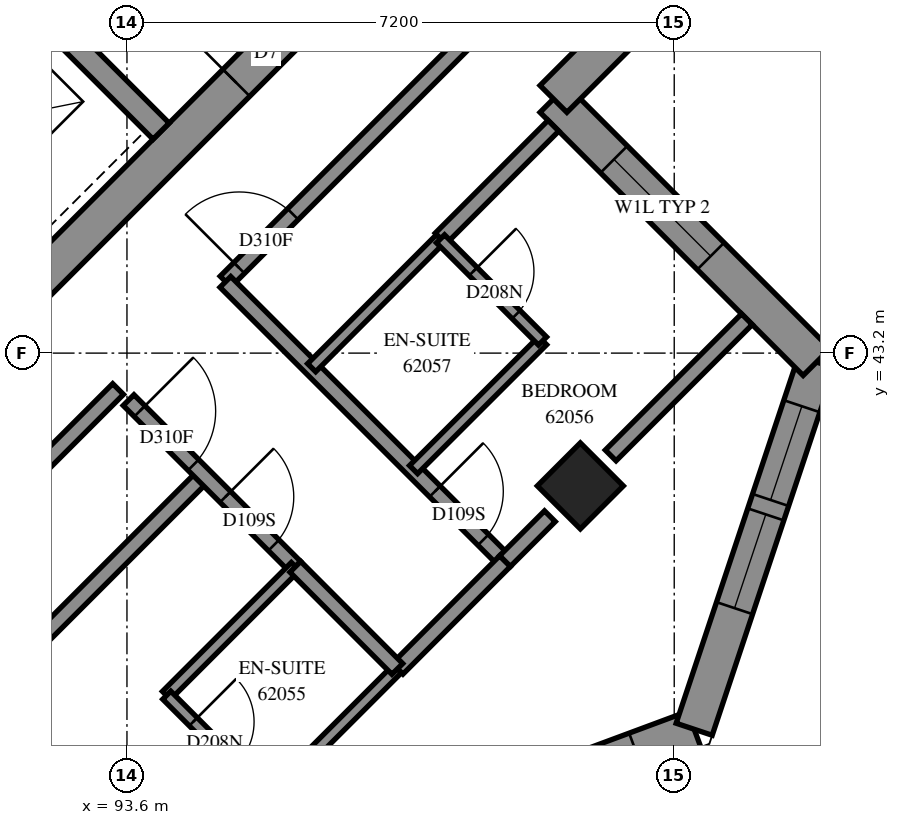
"""IFC4 building model, lengths in metres.
Left out: names, types, materials, properties, quantities, classifications, styles, units other than length and angle.
Written with IfcOpenShell. Run it as: python <this file> out.ifc"""

import sys

from ifc_helpers import new_model, si_unit, direction, frame, frame_2d, origin, origin_2d, place, context, subcontext, project, spatial, polyline, rectangle, outline, extrude, element, fill, save


model = new_model("IFC4")
c1 = context("Model", 3, precision=1e-05, world=origin(), true_north=direction((0.0, 1.0)))
c2 = subcontext(c1, "Body", "Model", "MODEL_VIEW")
j1 = project(units=[si_unit("LENGTHUNIT", "METRE"), si_unit("PLANEANGLEUNIT", "RADIAN")], contexts=[c1])
p1 = place(None, origin())
s1 = spatial("IfcSite", under=j1, at=p1, CompositionType="ELEMENT")
p2 = place(p1, origin())
s2 = spatial("IfcBuilding", under=s1, at=p2, CompositionType="ELEMENT")
p3 = place(p2, frame((0.0, 0.0, 227.0)))
s3 = spatial("IfcBuildingStorey", under=s2, at=p3, CompositionType="ELEMENT", Elevation=227.0)
p4 = place(p3, frame((99.565, 41.453, 0.0), z_axis=(0.0, 0.0, 1.0), x_axis=(0.7071067812, -0.7071067812, 0.0)))
e1 = element("IfcColumn", 1, at=p4, inside=s3, PredefinedType="COLUMN", context=c2, shape_type="SweptSolid", body=[
    extrude(rectangle(XDim=0.8, YDim=0.8, at=origin_2d()), origin(), (0.0, 0.0, 1.0), 3.1),
])
p5 = place(p3, frame((87.013, 38.731, -0.3), z_axis=(0.0, 0.0, 1.0), x_axis=(0.7071067812, 0.7071067812, 0.0)))
e2 = element("IfcWall", 2, at=p5, inside=s3, PredefinedType="SHEAR", context=c2, shape_type="SweptSolid", body=[
    extrude(rectangle(XDim=14.4, YDim=0.5, at=frame_2d((7.2, 0.0))), origin(), (0.0, 0.0, 1.0), 2.7),
])
p6 = place(p5, frame((4.55, 0.0, 0.3)))
e3 = element("IfcOpeningElement", 3, at=p6, cuts=e2, PredefinedType="OPENING", context=c2, shape_type="SweptSolid", body=[
    extrude(rectangle(XDim=1.1, YDim=2.1, at=frame_2d((0.55, 1.05))), frame((0.0, 0.26, 0.0), z_axis=(0.0, -1.0, 0.0), x_axis=(1.0, 0.0, 0.0)), (0.0, 0.0, 1.0), 0.52),
])
p7 = place(p5, frame((11.35, 0.0, 0.3)))
e4 = element("IfcOpeningElement", 4, at=p7, cuts=e2, PredefinedType="OPENING", context=c2, shape_type="SweptSolid", body=[
    extrude(rectangle(XDim=1.1, YDim=2.1, at=frame_2d((0.55, 1.05))), frame((0.0, 0.26, 0.0), z_axis=(0.0, -1.0, 0.0), x_axis=(1.0, 0.0, 0.0)), (0.0, 0.0, 1.0), 0.52),
])
p8 = place(p3, frame((88.958, 51.211, 0.0), z_axis=(0.0, 0.0, 1.0), x_axis=(0.7070998367, -0.7071137256, 0.0)))
e5 = element("IfcWall", 5, at=p8, inside=s3, PredefinedType="SOLIDWALL", context=c2, shape_type="SweptSolid", body=[
    extrude(rectangle(XDim=7.2, YDim=0.3, at=frame_2d((3.6, 0.0))), origin(), (0.0, 0.0, 1.0), 3.1),
])
p9 = place(p3, frame((96.118, 36.415, 0.0), z_axis=(0.0, 0.0, 1.0), x_axis=(0.9374238577, 0.3481903374, 0.0)))
e6 = element("IfcWall", 6, at=p9, inside=s3, PredefinedType="SOLIDWALL", context=c2, shape_type="SweptSolid", body=[
    extrude(outline(polyline([(0.115, -0.25), (5.395, -0.25), (5.155, 0.25), (-0.115, 0.25), (0.115, -0.25)])), origin(), (0.0, 0.0, 1.0), 3.1),
])
p10 = place(p9, frame((1.655, 0.0, 0.45)))
e7 = element("IfcOpeningElement", 7, at=p10, cuts=e6, PredefinedType="OPENING", context=c2, shape_type="SweptSolid", body=[
    extrude(rectangle(XDim=1.3, YDim=2.5, at=frame_2d((0.65, 1.25))), frame((0.0, 0.26, 0.0), z_axis=(0.0, -1.0, 0.0), x_axis=(1.0, 0.0, 0.0)), (0.0, 0.0, 1.0), 0.52),
])
p11 = place(p9, frame((3.155, 0.0, 0.45)))
e8 = element("IfcOpeningElement", 8, at=p11, cuts=e6, PredefinedType="OPENING", context=c2, shape_type="SweptSolid", body=[
    extrude(rectangle(XDim=1.3, YDim=2.5, at=frame_2d((0.65, 1.25))), frame((0.0, 0.26, 0.0), z_axis=(0.0, -1.0, 0.0), x_axis=(1.0, 0.0, 0.0)), (0.0, 0.0, 1.0), 0.52),
])
p12 = place(p3, frame((101.062, 38.252, 0.0), z_axis=(0.0, 0.0, 1.0), x_axis=(0.3162395484, 0.9486793705, 0.0)))
e9 = element("IfcWall", 9, at=p12, inside=s3, PredefinedType="SOLIDWALL", context=c2, shape_type="SweptSolid", body=[
    extrude(outline(polyline([(-0.12, -0.25), (5.247, -0.25), (4.938, 0.25), (0.12, 0.25), (-0.12, -0.25)])), origin(), (0.0, 0.0, 1.0), 3.1),
])
p13 = place(p12, frame((1.68, 0.0, 0.45)))
e10 = element("IfcOpeningElement", 10, at=p13, cuts=e9, PredefinedType="OPENING", context=c2, shape_type="SweptSolid", body=[
    extrude(rectangle(XDim=1.3, YDim=2.5, at=frame_2d((0.65, 1.25))), frame((0.0, 0.26, 0.0), z_axis=(0.0, -1.0, 0.0), x_axis=(1.0, 0.0, 0.0)), (0.0, 0.0, 1.0), 0.52),
])
p14 = place(p12, frame((3.18, 0.0, 0.45)))
e11 = element("IfcOpeningElement", 11, at=p14, cuts=e9, PredefinedType="OPENING", context=c2, shape_type="SweptSolid", body=[
    extrude(rectangle(XDim=1.3, YDim=2.5, at=frame_2d((0.65, 1.25))), frame((0.0, 0.26, 0.0), z_axis=(0.0, -1.0, 0.0), x_axis=(1.0, 0.0, 0.0)), (0.0, 0.0, 1.0), 0.52),
])
p15 = place(p3, frame((102.673, 43.083, 0.0), z_axis=(0.0, 0.0, 1.0), x_axis=(-0.7071067812, 0.7071067812, 0.0)))
e12 = element("IfcWall", 12, at=p15, inside=s3, PredefinedType="SOLIDWALL", context=c2, shape_type="SweptSolid", body=[
    extrude(outline(polyline([(-0.154, -0.25), (4.646, -0.25), (5.146, 0.25), (0.154, 0.25), (-0.154, -0.25)])), origin(), (0.0, 0.0, 1.0), 3.1),
])
p16 = place(p15, frame((1.97, 0.0, 0.6)))
e13 = element("IfcOpeningElement", 13, at=p16, cuts=e12, PredefinedType="OPENING", context=c2, shape_type="SweptSolid", body=[
    extrude(rectangle(XDim=1.8, YDim=1.9, at=frame_2d((0.9, 0.95))), frame((0.0, 0.26, 0.0), z_axis=(0.0, -1.0, 0.0), x_axis=(1.0, 0.0, 0.0)), (0.0, 0.0, 1.0), 0.52),
])
p17 = place(p3, frame((99.211, 46.544, 0.0), z_axis=(0.0, 0.0, 1.0), x_axis=(0.7071067812, 0.7071067812, 0.0)))
e14 = element("IfcWall", 14, at=p17, inside=s3, PredefinedType="SOLIDWALL", context=c2, shape_type="SweptSolid", body=[
    extrude(outline(polyline([(0.25, -0.25), (6.28, -0.25), (5.563, 0.25), (-0.25, 0.25), (0.25, -0.25)])), origin(), (0.0, 0.0, 1.0), 3.1),
])
p18 = place(p17, frame((1.125, 0.0, 0.6)))
e15 = element("IfcOpeningElement", 15, at=p18, cuts=e14, PredefinedType="OPENING", context=c2, shape_type="SweptSolid", body=[
    extrude(rectangle(XDim=1.8, YDim=1.9, at=frame_2d((0.9, 0.95))), frame((0.0, 0.26, 0.0), z_axis=(0.0, -1.0, 0.0), x_axis=(1.0, 0.0, 0.0)), (0.0, 0.0, 1.0), 0.52),
])
p19 = place(p17, frame((4.006, 0.0, 0.6)))
e16 = element("IfcOpeningElement", 16, at=p19, cuts=e14, PredefinedType="OPENING", context=c2, shape_type="SweptSolid", body=[
    extrude(rectangle(XDim=1.2, YDim=1.9, at=frame_2d((0.6, 0.95))), frame((0.0, 0.26, 0.0), z_axis=(0.0, -1.0, 0.0), x_axis=(1.0, 0.0, 0.0)), (0.0, 0.0, 1.0), 0.52),
])
p20 = place(p3, frame((85.026, 32.008, 0.0), z_axis=(0.0, 0.0, 1.0), x_axis=(0.7071030933, 0.707110469, 0.0)))
e17 = element("IfcWall", 17, at=p20, inside=s3, PredefinedType="PARTITIONING", context=c2, shape_type="SweptSolid", body=[
    extrude(rectangle(XDim=13.558, YDim=0.2, at=frame_2d((6.779, 0.0))), origin(), (0.0, 0.0, 1.0), 3.1),
])
p21 = place(p3, frame((86.835, 36.079, 0.0), z_axis=(0.0, 0.0, 1.0), x_axis=(0.7071067812, 0.7071067812, 0.0)))
e18 = element("IfcWall", 18, at=p21, inside=s3, PredefinedType="PARTITIONING", context=c2, shape_type="SweptSolid", body=[
    extrude(rectangle(XDim=9.402, YDim=0.2, at=frame_2d((4.701, 0.0))), origin(), (0.0, 0.0, 1.0), 3.1),
])
p22 = place(p3, frame((94.897, 44.141, 0.0), z_axis=(0.0, 0.0, 1.0), x_axis=(0.7071067812, 0.7071067812, 0.0)))
e19 = element("IfcWall", 19, at=p22, inside=s3, PredefinedType="PARTITIONING", context=c2, shape_type="SweptSolid", body=[
    extrude(rectangle(XDim=7.0, YDim=0.2, at=frame_2d((3.5, 0.0))), origin(), (0.0, 0.0, 1.0), 3.1),
])
p23 = place(p22, frame((0.253, 0.0, 0.0)))
e20 = element("IfcOpeningElement", 20, at=p23, cuts=e19, PredefinedType="OPENING", context=c2, shape_type="SweptSolid", body=[
    extrude(rectangle(XDim=1.0, YDim=2.1, at=frame_2d((0.5, 1.05))), frame((0.0, 0.11, 0.0), z_axis=(0.0, -1.0, 0.0), x_axis=(1.0, 0.0, 0.0)), (0.0, 0.0, 1.0), 0.22),
])
p24 = place(p3, frame((94.895, 44.137, 0.0), z_axis=(0.0, 0.0, 1.0), x_axis=(0.7071067812, -0.7071067812, 0.0)))
e21 = element("IfcWall", 21, at=p24, inside=s3, PredefinedType="PARTITIONING", context=c2, shape_type="SweptSolid", body=[
    extrude(rectangle(XDim=5.199, YDim=0.2, at=frame_2d((2.599, 0.0))), origin(), (0.0, 0.0, 1.0), 3.1),
])
p25 = place(p24, frame((3.898, 0.0, 0.0)))
e22 = element("IfcOpeningElement", 22, at=p25, cuts=e21, PredefinedType="OPENING", context=c2, shape_type="SweptSolid", body=[
    extrude(rectangle(XDim=0.9, YDim=2.1, at=frame_2d((0.45, 1.05))), frame((0.0, 0.11, 0.0), z_axis=(0.0, -1.0, 0.0), x_axis=(1.0, 0.0, 0.0)), (0.0, 0.0, 1.0), 0.22),
])
p26 = place(p3, frame((93.621, 42.581, 0.0), z_axis=(0.0, 0.0, 1.0), x_axis=(0.7071067812, -0.7071067812, 0.0)))
e23 = element("IfcWall", 23, at=p26, inside=s3, PredefinedType="PARTITIONING", context=c2, shape_type="SweptSolid", body=[
    extrude(rectangle(XDim=3.1, YDim=0.2, at=frame_2d((1.55, 0.0))), origin(), (0.0, 0.0, 1.0), 3.1),
])
p27 = place(p26, frame((0.206, 0.0, 0.0)))
e24 = element("IfcOpeningElement", 24, at=p27, cuts=e23, PredefinedType="OPENING", context=c2, shape_type="SweptSolid", body=[
    extrude(rectangle(XDim=1.0, YDim=2.1, at=frame_2d((0.5, 1.05))), frame((0.0, 0.11, 0.0), z_axis=(0.0, -1.0, 0.0), x_axis=(1.0, 0.0, 0.0)), (0.0, 0.0, 1.0), 0.22),
])
p28 = place(p26, frame((1.8, 0.0, 0.0)))
e25 = element("IfcOpeningElement", 25, at=p28, cuts=e23, PredefinedType="OPENING", context=c2, shape_type="SweptSolid", body=[
    extrude(rectangle(XDim=0.9, YDim=2.1, at=frame_2d((0.45, 1.05))), frame((0.0, 0.11, 0.0), z_axis=(0.0, -1.0, 0.0), x_axis=(1.0, 0.0, 0.0)), (0.0, 0.0, 1.0), 0.22),
])
p29 = place(p3, frame((99.964, 41.854, 0.0), z_axis=(0.0, 0.0, 1.0), x_axis=(0.7071265121, 0.7070870497, 0.0)))
e26 = element("IfcWall", 26, at=p29, inside=s3, PredefinedType="PARTITIONING", context=c2, shape_type="SweptSolid", body=[
    extrude(rectangle(XDim=2.534, YDim=0.2, at=frame_2d((1.267, 0.0))), origin(), (0.0, 0.0, 1.0), 3.1),
])
for number, where, z_axis, x_axis in (
    (27, (97.371, 41.667, 0.0), (0.0, 0.0, 1.0), (0.708, 0.707, 0.0)),
    (28, (96.03, 43.008, 0.0), (0.0, 0.0, 1.0), (0.707, 0.708, 0.0)),
):
    element("IfcWall", number, at=place(p3, frame(where, z_axis=z_axis, x_axis=x_axis)), inside=s3, PredefinedType="PARTITIONING", context=c2, shape_type="SweptSolid", body=[
        extrude(rectangle(XDim=2.4, YDim=0.15, at=frame_2d((1.2, 0.0))), origin(), (0.0, 0.0, 1.0), 3.1),
    ])
p30 = place(p3, frame((94.12, 38.697, 0.0), z_axis=(0.0, 0.0, 1.0), x_axis=(0.7071067812, 0.7071067812, 0.0)))
e29 = element("IfcWall", 29, at=p30, inside=s3, PredefinedType="PARTITIONING", context=c2, shape_type="SweptSolid", body=[
    extrude(rectangle(XDim=2.398, YDim=0.15, at=frame_2d((1.199, 0.0))), origin(), (0.0, 0.0, 1.0), 3.1),
])
p31 = place(p3, frame((95.463, 37.353, 0.0), z_axis=(0.0, 0.0, 1.0), x_axis=(0.7071067812, 0.7071067812, 0.0)))
e30 = element("IfcWall", 30, at=p31, inside=s3, PredefinedType="PARTITIONING", context=c2, shape_type="SweptSolid", body=[
    extrude(rectangle(XDim=2.398, YDim=0.15, at=frame_2d((1.199, 0.0))), origin(), (0.0, 0.0, 1.0), 2.6),
])
p32 = place(p3, frame((97.726, 44.708, 0.0), z_axis=(0.0, 0.0, 1.0), x_axis=(0.7071067812, 0.7071067812, 0.0)))
e31 = element("IfcWall", 31, at=p32, inside=s3, PredefinedType="PARTITIONING", context=c2, shape_type="SweptSolid", body=[
    extrude(rectangle(XDim=2.099, YDim=0.2, at=frame_2d((1.049, 0.0))), origin(), (0.0, 0.0, 1.0), 3.1),
])
p33 = place(p3, frame((97.16, 39.048, 0.0), z_axis=(0.0, 0.0, 1.0), x_axis=(0.7066068826, 0.7076063266, 0.0)))
e32 = element("IfcWall", 32, at=p33, inside=s3, PredefinedType="PARTITIONING", context=c2, shape_type="SweptSolid", body=[
    extrude(rectangle(XDim=2.001, YDim=0.2, at=frame_2d((1.001, 0.0))), origin(), (0.0, 0.0, 1.0), 2.6),
])
p34 = place(p3, frame((94.124, 38.7, 0.0), z_axis=(0.0, 0.0, 1.0), x_axis=(0.7071067812, -0.7071067812, 0.0)))
e33 = element("IfcWall", 33, at=p34, inside=s3, PredefinedType="PARTITIONING", context=c2, shape_type="SweptSolid", body=[
    extrude(rectangle(XDim=1.901, YDim=0.15, at=frame_2d((0.95, 0.0))), origin(), (0.0, 0.0, 1.0), 3.1),
])
p35 = place(p34, frame((0.494, 0.0, 0.0)))
e34 = element("IfcOpeningElement", 34, at=p35, cuts=e33, PredefinedType="OPENING", context=c2, shape_type="SweptSolid", body=[
    extrude(rectangle(XDim=0.8, YDim=2.1, at=frame_2d((0.4, 1.05))), frame((0.0, 0.085, 0.0), z_axis=(0.0, -1.0, 0.0), x_axis=(1.0, 0.0, 0.0)), (0.0, 0.0, 1.0), 0.17),
])
p36 = place(p3, frame((95.815, 40.389, 0.0), z_axis=(0.0, 0.0, 1.0), x_axis=(0.7065800724, -0.7076330979, 0.0)))
e35 = element("IfcWall", 35, at=p36, inside=s3, PredefinedType="PARTITIONING", context=c2, shape_type="SweptSolid", body=[
    extrude(rectangle(XDim=1.899, YDim=0.2, at=frame_2d((0.95, 0.0))), origin(), (0.0, 0.0, 1.0), 3.1),
])
p37 = place(p3, frame((97.725, 44.703, 0.0), z_axis=(0.0, 0.0, 1.0), x_axis=(0.7065800724, -0.7076330979, 0.0)))
e36 = element("IfcWall", 36, at=p37, inside=s3, PredefinedType="PARTITIONING", context=c2, shape_type="SweptSolid", body=[
    extrude(rectangle(XDim=1.899, YDim=0.15, at=frame_2d((0.95, 0.0))), origin(), (0.0, 0.0, 1.0), 3.1),
])
p38 = place(p37, frame((0.608, 0.0, 0.0)))
e37 = element("IfcOpeningElement", 37, at=p38, cuts=e36, PredefinedType="OPENING", context=c2, shape_type="SweptSolid", body=[
    extrude(rectangle(XDim=0.8, YDim=2.1, at=frame_2d((0.4, 1.05))), frame((0.0, 0.085, 0.0), z_axis=(0.0, -1.0, 0.0), x_axis=(1.0, 0.0, 0.0)), (0.0, 0.0, 1.0), 0.17),
])
p39 = place(p3, frame((98.574, 40.464, 0.0), z_axis=(0.0, 0.0, 1.0), x_axis=(0.7071067812, 0.7071067812, 0.0)))
e38 = element("IfcWall", 38, at=p39, inside=s3, PredefinedType="PARTITIONING", context=c2, shape_type="SweptSolid", body=[
    extrude(rectangle(XDim=0.834, YDim=0.2, at=frame_2d((0.417, 0.0))), origin(), (0.0, 0.0, 1.0), 2.6),
])
p40 = place(p11, origin())
e39 = element("IfcWindow", 39, at=p40, inside=s3, PartitioningType="SINGLE_PANEL", PredefinedType="WINDOW", context=c2, shape_type="SweptSolid", body=[
    extrude(rectangle(XDim=1.3, YDim=2.5, at=frame_2d((0.65, 1.25))), frame((0.0, 0.18, 0.0), z_axis=(0.0, -1.0, 0.0), x_axis=(1.0, 0.0, 0.0)), (0.0, 0.0, 1.0), 0.06),
])
fill(e8, e39)
p41 = place(p13, origin())
e40 = element("IfcWindow", 40, at=p41, inside=s3, PartitioningType="SINGLE_PANEL", PredefinedType="WINDOW", context=c2, shape_type="SweptSolid", body=[
    extrude(rectangle(XDim=1.3, YDim=2.5, at=frame_2d((0.65, 1.25))), frame((0.0, 0.18, 0.0), z_axis=(0.0, -1.0, 0.0), x_axis=(1.0, 0.0, 0.0)), (0.0, 0.0, 1.0), 0.06),
])
fill(e10, e40)
p42 = place(p14, origin())
e41 = element("IfcWindow", 41, at=p42, inside=s3, PartitioningType="SINGLE_PANEL", PredefinedType="WINDOW", context=c2, shape_type="SweptSolid", body=[
    extrude(rectangle(XDim=1.3, YDim=2.5, at=frame_2d((0.65, 1.25))), frame((0.0, 0.18, 0.0), z_axis=(0.0, -1.0, 0.0), x_axis=(1.0, 0.0, 0.0)), (0.0, 0.0, 1.0), 0.06),
])
fill(e11, e41)
p43 = place(p16, origin())
e42 = element("IfcWindow", 42, at=p43, inside=s3, PartitioningType="SINGLE_PANEL", PredefinedType="WINDOW", context=c2, shape_type="SweptSolid", body=[
    extrude(rectangle(XDim=1.8, YDim=1.9, at=frame_2d((0.9, 0.95))), frame((0.0, 0.18, 0.0), z_axis=(0.0, -1.0, 0.0), x_axis=(1.0, 0.0, 0.0)), (0.0, 0.0, 1.0), 0.06),
])
fill(e13, e42)
p44 = place(p7, origin())
e43 = element("IfcDoor", 43, at=p44, inside=s3, OperationType="SINGLE_SWING_RIGHT", PredefinedType="DOOR", context=c2, shape_type="SweptSolid", body=[
    extrude(rectangle(XDim=1.1, YDim=2.1, at=frame_2d((0.55, 1.05))), frame((0.0, 0.025, 0.0), z_axis=(0.0, -1.0, 0.0), x_axis=(1.0, 0.0, 0.0)), (0.0, 0.0, 1.0), 0.05),
])
fill(e4, e43)
p45 = place(p23, origin())
e44 = element("IfcDoor", 44, at=p45, inside=s3, OperationType="SINGLE_SWING_RIGHT", PredefinedType="DOOR", context=c2, shape_type="SweptSolid", body=[
    extrude(rectangle(XDim=1.0, YDim=2.1, at=frame_2d((0.5, 1.05))), frame((0.0, 0.025, 0.0), z_axis=(0.0, -1.0, 0.0), x_axis=(1.0, 0.0, 0.0)), (0.0, 0.0, 1.0), 0.05),
])
fill(e20, e44)
p46 = place(p27, origin())
e45 = element("IfcDoor", 45, at=p46, inside=s3, OperationType="SINGLE_SWING_RIGHT", PredefinedType="DOOR", context=c2, shape_type="SweptSolid", body=[
    extrude(rectangle(XDim=1.0, YDim=2.1, at=frame_2d((0.5, 1.05))), frame((0.0, 0.025, 0.0), z_axis=(0.0, -1.0, 0.0), x_axis=(1.0, 0.0, 0.0)), (0.0, 0.0, 1.0), 0.05),
])
fill(e24, e45)
p47 = place(p28, origin())
e46 = element("IfcDoor", 46, at=p47, inside=s3, OperationType="SINGLE_SWING_LEFT", PredefinedType="DOOR", context=c2, shape_type="SweptSolid", body=[
    extrude(rectangle(XDim=0.9, YDim=2.1, at=frame_2d((0.45, 1.05))), frame((0.0, 0.025, 0.0), z_axis=(0.0, -1.0, 0.0), x_axis=(1.0, 0.0, 0.0)), (0.0, 0.0, 1.0), 0.05),
])
fill(e25, e46)
p48 = place(p35, origin())
e47 = element("IfcDoor", 47, at=p48, inside=s3, OperationType="SINGLE_SWING_RIGHT", PredefinedType="DOOR", context=c2, shape_type="SweptSolid", body=[
    extrude(rectangle(XDim=0.8, YDim=2.1, at=frame_2d((0.4, 1.05))), frame((0.0, 0.025, 0.0), z_axis=(0.0, -1.0, 0.0), x_axis=(1.0, 0.0, 0.0)), (0.0, 0.0, 1.0), 0.05),
])
fill(e34, e47)
p49 = place(p25, origin())
e48 = element("IfcDoor", 48, at=p49, inside=s3, OperationType="SINGLE_SWING_RIGHT", PredefinedType="DOOR", context=c2, shape_type="SweptSolid", body=[
    extrude(rectangle(XDim=0.9, YDim=2.1, at=frame_2d((0.45, 1.05))), frame((0.0, 0.025, 0.0), z_axis=(0.0, -1.0, 0.0), x_axis=(1.0, 0.0, 0.0)), (0.0, 0.0, 1.0), 0.05),
])
fill(e22, e48)
p50 = place(p38, origin())
e49 = element("IfcDoor", 49, at=p50, inside=s3, OperationType="SINGLE_SWING_RIGHT", PredefinedType="DOOR", context=c2, shape_type="SweptSolid", body=[
    extrude(rectangle(XDim=0.8, YDim=2.1, at=frame_2d((0.4, 1.05))), frame((0.0, 0.025, 0.0), z_axis=(0.0, -1.0, 0.0), x_axis=(1.0, 0.0, 0.0)), (0.0, 0.0, 1.0), 0.05),
])
fill(e37, e49)
save(model, sys.argv[1])
